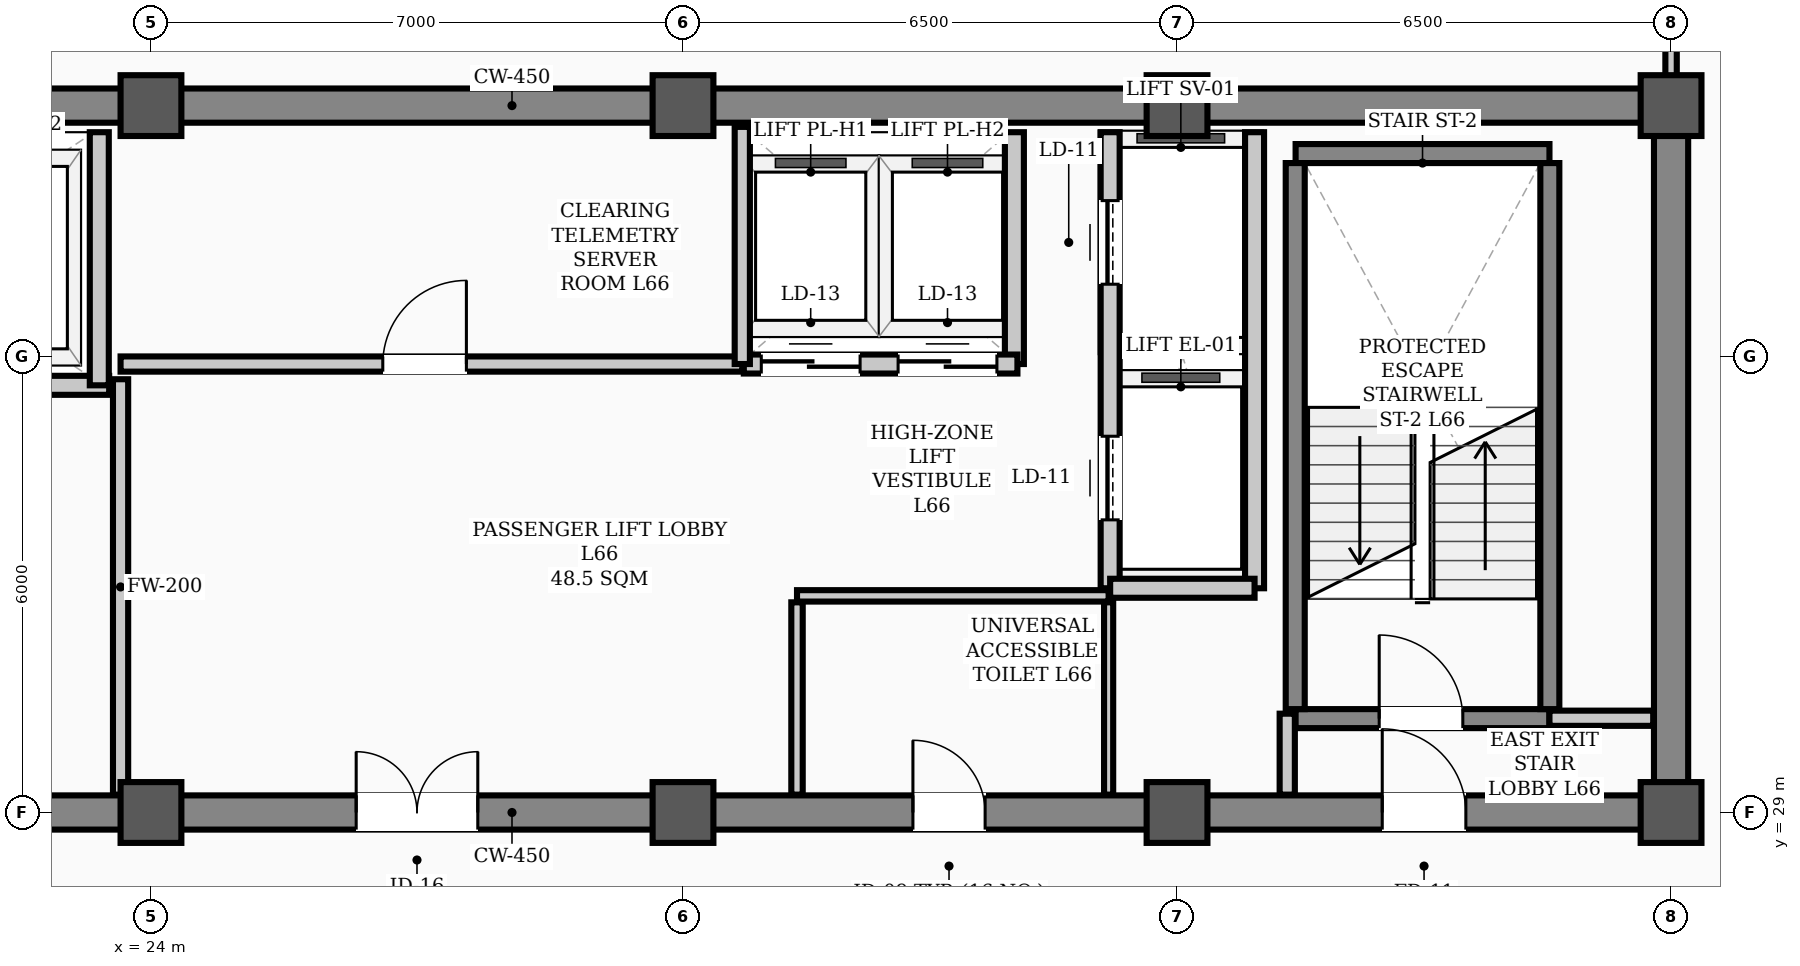
"""IFC4 building model, lengths in metres.
Left out: names, types, materials, properties, quantities, classifications, styles, units other than length and angle.
Written with IfcOpenShell. Run it as: python <this file> out.ifc"""

import sys

from ifc_helpers import new_model, si_unit, direction, frame, frame_2d, origin, origin_2d, place, context, subcontext, project, spatial, rectangle, hollow_rectangle, extrude, element, fill, save


model = new_model("IFC4")
c1 = context("Model", 3, precision=1e-05, world=origin(), true_north=direction((0.0, 1.0)))
c2 = subcontext(c1, "Body", "Model", "MODEL_VIEW")
j1 = project(units=[si_unit("LENGTHUNIT", "METRE"), si_unit("PLANEANGLEUNIT", "RADIAN")], contexts=[c1])
p1 = place(None, origin())
s1 = spatial("IfcSite", under=j1, at=p1, CompositionType="ELEMENT")
p2 = place(p1, origin())
s2 = spatial("IfcBuilding", under=s1, at=p2, CompositionType="ELEMENT")
p3 = place(p2, frame((0.0, 0.0, 265.7)))
s3 = spatial("IfcBuildingStorey", under=s2, at=p3, CompositionType="ELEMENT", Elevation=265.7)
for number, where, z_axis, x_axis in (
    (1, (24.0, 29.0, 0.0), (0.0, 0.0, 1.0), (1.0, 0.0, 0.0)),
    (2, (24.0, 38.3, 0.0), (0.0, 0.0, 1.0), (1.0, 0.0, 0.0)),
    (3, (31.0, 29.0, 0.0), (0.0, 0.0, 1.0), (1.0, 0.0, 0.0)),
    (4, (31.0, 38.3, 0.0), (0.0, 0.0, 1.0), (1.0, 0.0, 0.0)),
    (5, (37.5, 29.0, 0.0), (0.0, 0.0, 1.0), (1.0, 0.0, 0.0)),
    (6, (37.5, 38.3, 0.0), (0.0, 0.0, 1.0), (1.0, 0.0, 0.0)),
    (7, (44.0, 29.0, 0.0), (0.0, 0.0, 1.0), (1.0, 0.0, 0.0)),
    (8, (44.0, 38.3, 0.0), (0.0, 0.0, 1.0), (1.0, 0.0, 0.0)),
):
    element("IfcColumn", number, at=place(p3, frame(where, z_axis=z_axis, x_axis=x_axis)), inside=s3, PredefinedType="COLUMN", context=c2, shape_type="SweptSolid", body=[
        extrude(hollow_rectangle(XDim=0.8, YDim=0.8, WallThickness=0.032, InnerFilletRadius=0.016, OuterFilletRadius=0.048, at=origin_2d()), origin(), (0.0, 0.0, 1.0), 3.9),
    ])
p4 = place(p3, frame((13.5, 29.0, 0.0), z_axis=(0.0, 0.0, 1.0), x_axis=(1.0, 0.0, 0.0)))
e9 = element("IfcWall", 9, at=p4, inside=s3, PredefinedType="SHEAR", context=c2, shape_type="SweptSolid", body=[
    extrude(rectangle(XDim=30.5, YDim=0.45, at=frame_2d((15.25, 0.0))), origin(), (0.0, 0.0, 1.0), 3.72),
])
p5 = place(p4, frame((1.75, 0.0, 0.0)))
e10 = element("IfcOpeningElement", 10, at=p5, cuts=e9, PredefinedType="OPENING", context=c2, shape_type="SweptSolid", body=[
    extrude(rectangle(XDim=1.1, YDim=2.08, at=frame_2d((0.55, 1.04))), frame((0.0, 0.235, 0.0), z_axis=(0.0, -1.0, 0.0), x_axis=(1.0, 0.0, 0.0)), (0.0, 0.0, 1.0), 0.47),
])
p6 = place(p4, frame((26.7, 0.0, 0.0)))
e11 = element("IfcOpeningElement", 11, at=p6, cuts=e9, PredefinedType="OPENING", context=c2, shape_type="SweptSolid", body=[
    extrude(rectangle(XDim=1.1, YDim=2.08, at=frame_2d((0.55, 1.04))), frame((0.0, 0.235, 0.0), z_axis=(0.0, -1.0, 0.0), x_axis=(1.0, 0.0, 0.0)), (0.0, 0.0, 1.0), 0.47),
])
p7 = place(p4, frame((6.8, 0.0, 0.0)))
e12 = element("IfcOpeningElement", 12, at=p7, cuts=e9, PredefinedType="OPENING", context=c2, shape_type="SweptSolid", body=[
    extrude(rectangle(XDim=1.1, YDim=2.08, at=frame_2d((0.55, 1.04))), frame((0.0, 0.235, 0.0), z_axis=(0.0, -1.0, 0.0), x_axis=(1.0, 0.0, 0.0)), (0.0, 0.0, 1.0), 0.47),
])
p8 = place(p4, frame((13.2, 0.0, 0.0)))
e13 = element("IfcOpeningElement", 13, at=p8, cuts=e9, PredefinedType="OPENING", context=c2, shape_type="SweptSolid", body=[
    extrude(rectangle(XDim=1.6, YDim=2.08, at=frame_2d((0.8, 1.04))), frame((0.0, 0.235, 0.0), z_axis=(0.0, -1.0, 0.0), x_axis=(1.0, 0.0, 0.0)), (0.0, 0.0, 1.0), 0.47),
])
p9 = place(p4, frame((20.525, 0.0, 0.0)))
e14 = element("IfcOpeningElement", 14, at=p9, cuts=e9, PredefinedType="OPENING", context=c2, shape_type="SweptSolid", body=[
    extrude(rectangle(XDim=0.95, YDim=2.08, at=frame_2d((0.475, 1.04))), frame((0.0, 0.235, 0.0), z_axis=(0.0, -1.0, 0.0), x_axis=(1.0, 0.0, 0.0)), (0.0, 0.0, 1.0), 0.47),
])
p10 = place(p3, frame((13.5, 38.3, 0.0), z_axis=(0.0, 0.0, 1.0), x_axis=(1.0, 0.0, 0.0)))
e15 = element("IfcWall", 15, at=p10, inside=s3, PredefinedType="SHEAR", context=c2, shape_type="SweptSolid", body=[
    extrude(rectangle(XDim=30.5, YDim=0.45, at=frame_2d((15.25, 0.0))), origin(), (0.0, 0.0, 1.0), 3.72),
])
p11 = place(p3, frame((44.0, 29.35, 0.0), z_axis=(0.0, 0.0, 1.0), x_axis=(0.0, 1.0, 0.0)))
e16 = element("IfcWall", 16, at=p11, inside=s3, PredefinedType="SHEAR", context=c2, shape_type="SweptSolid", body=[
    extrude(rectangle(XDim=8.6, YDim=0.45, at=frame_2d((4.3, 0.0))), origin(), (0.0, 0.0, 1.0), 3.72),
])
p12 = place(p3, frame((39.06, 30.235, 0.0), z_axis=(0.0, 0.0, 1.0), x_axis=(1.0, 0.0, 0.0)))
e17 = element("IfcWall", 17, at=p12, inside=s3, PredefinedType="STANDARD", context=c2, shape_type="SweptSolid", body=[
    extrude(rectangle(XDim=3.34, YDim=0.25, at=frame_2d((1.67, 0.0))), origin(), (0.0, 0.0, 1.0), 3.72),
])
p13 = place(p12, frame((1.1, 0.0, 0.0)))
e18 = element("IfcOpeningElement", 18, at=p13, cuts=e17, PredefinedType="OPENING", context=c2, shape_type="SweptSolid", body=[
    extrude(rectangle(XDim=1.1, YDim=2.08, at=frame_2d((0.55, 1.04))), frame((0.0, 0.135, 0.0), z_axis=(0.0, -1.0, 0.0), x_axis=(1.0, 0.0, 0.0)), (0.0, 0.0, 1.0), 0.27),
])
p14 = place(p3, frame((39.06, 37.669, 0.0), z_axis=(0.0, 0.0, 1.0), x_axis=(1.0, 0.0, 0.0)))
e19 = element("IfcWall", 19, at=p14, inside=s3, PredefinedType="STANDARD", context=c2, shape_type="SweptSolid", body=[
    extrude(rectangle(XDim=3.34, YDim=0.25, at=frame_2d((1.67, 0.0))), origin(), (0.0, 0.0, 1.0), 3.72),
])
for number, where, z_axis, x_axis in (
    (20, (39.055, 30.36, 0.0), (0.0, 0.0, 1.0), (0.0, 1.0, 0.0)),
    (21, (42.405, 30.36, 0.0), (0.0, 0.0, 1.0), (0.0, 1.0, 0.0)),
):
    element("IfcWall", number, at=place(p3, frame(where, z_axis=z_axis, x_axis=x_axis)), inside=s3, PredefinedType="STANDARD", context=c2, shape_type="SweptSolid", body=[
        extrude(rectangle(XDim=7.184, YDim=0.25, at=frame_2d((3.592, 0.0))), origin(), (0.0, 0.0, 1.0), 3.72),
    ])
p15 = place(p3, frame((18.1, 34.62, 0.0), z_axis=(0.0, 0.0, 1.0), x_axis=(1.0, 0.0, 0.0)))
e22 = element("IfcWall", 22, at=p15, inside=s3, PredefinedType="STANDARD", context=c2, shape_type="SweptSolid", body=[
    extrude(rectangle(XDim=5.35, YDim=0.25, at=frame_2d((2.675, 0.0))), origin(), (0.0, 0.0, 1.0), 3.72),
])
p16 = place(p15, frame((0.85, 0.0, 0.0)))
e23 = element("IfcOpeningElement", 23, at=p16, cuts=e22, PredefinedType="OPENING", context=c2, shape_type="SweptSolid", body=[
    extrude(rectangle(XDim=1.1, YDim=2.08, at=frame_2d((0.55, 1.04))), frame((0.0, 0.135, 0.0), z_axis=(0.0, -1.0, 0.0), x_axis=(1.0, 0.0, 0.0)), (0.0, 0.0, 1.0), 0.27),
])
p17 = place(p15, frame((3.45, 0.0, 0.0)))
e24 = element("IfcOpeningElement", 24, at=p17, cuts=e22, PredefinedType="OPENING", context=c2, shape_type="SweptSolid", body=[
    extrude(rectangle(XDim=1.1, YDim=2.08, at=frame_2d((0.55, 1.04))), frame((0.0, 0.135, 0.0), z_axis=(0.0, -1.0, 0.0), x_axis=(1.0, 0.0, 0.0)), (0.0, 0.0, 1.0), 0.27),
])
p18 = place(p3, frame((36.62, 31.95, 0.0), z_axis=(0.0, 0.0, 1.0), x_axis=(0.0, 1.0, 0.0)))
e25 = element("IfcWall", 25, at=p18, inside=s3, PredefinedType="STANDARD", context=c2, shape_type="SweptSolid", body=[
    extrude(rectangle(XDim=6.0, YDim=0.25, at=frame_2d((3.0, 0.0))), origin(), (0.0, 0.0, 1.0), 3.4),
])
p19 = place(p18, frame((0.9, 0.0, 0.0)))
e26 = element("IfcOpeningElement", 26, at=p19, cuts=e25, PredefinedType="OPENING", context=c2, shape_type="SweptSolid", body=[
    extrude(rectangle(XDim=1.1, YDim=2.08, at=frame_2d((0.55, 1.04))), frame((0.0, 0.135, 0.0), z_axis=(0.0, -1.0, 0.0), x_axis=(1.0, 0.0, 0.0)), (0.0, 0.0, 1.0), 0.27),
])
p20 = place(p18, frame((4.0, 0.0, 0.0)))
e27 = element("IfcOpeningElement", 27, at=p20, cuts=e25, PredefinedType="OPENING", context=c2, shape_type="SweptSolid", body=[
    extrude(rectangle(XDim=1.1, YDim=2.08, at=frame_2d((0.55, 1.04))), frame((0.0, 0.135, 0.0), z_axis=(0.0, -1.0, 0.0), x_axis=(1.0, 0.0, 0.0)), (0.0, 0.0, 1.0), 0.27),
])
p21 = place(p3, frame((38.52, 31.95, 0.0), z_axis=(0.0, 0.0, 1.0), x_axis=(0.0, 1.0, 0.0)))
e28 = element("IfcWall", 28, at=p21, inside=s3, PredefinedType="STANDARD", context=c2, shape_type="SweptSolid", body=[
    extrude(rectangle(XDim=6.0, YDim=0.25, at=frame_2d((3.0, 0.0))), origin(), (0.0, 0.0, 1.0), 3.48),
])
p22 = place(p3, frame((36.62, 31.95, 0.0), z_axis=(0.0, 0.0, 1.0), x_axis=(1.0, 0.0, 0.0)))
e29 = element("IfcWall", 29, at=p22, inside=s3, PredefinedType="STANDARD", context=c2, shape_type="SweptSolid", body=[
    extrude(rectangle(XDim=1.9, YDim=0.25, at=frame_2d((0.95, 0.0))), origin(), (0.0, 0.0, 1.0), 3.48),
])
p23 = place(p3, frame((23.32, 34.62, 0.0), z_axis=(0.0, 0.0, 1.0), x_axis=(0.0, 1.0, 0.0)))
e30 = element("IfcWall", 30, at=p23, inside=s3, PredefinedType="STANDARD", context=c2, shape_type="SweptSolid", body=[
    extrude(rectangle(XDim=3.33, YDim=0.25, at=frame_2d((1.665, 0.0))), origin(), (0.0, 0.0, 1.0), 3.4),
])
p24 = place(p3, frame((35.36, 34.9, 0.0), z_axis=(0.0, 0.0, 1.0), x_axis=(0.0, 1.0, 0.0)))
e31 = element("IfcWall", 31, at=p24, inside=s3, PredefinedType="STANDARD", context=c2, shape_type="SweptSolid", body=[
    extrude(rectangle(XDim=3.05, YDim=0.25, at=frame_2d((1.525, 0.0))), origin(), (0.0, 0.0, 1.0), 3.4),
])
p25 = place(p3, frame((31.8, 34.9, 0.0), z_axis=(0.0, 0.0, 1.0), x_axis=(1.0, 0.0, 0.0)))
e32 = element("IfcWall", 32, at=p25, inside=s3, PredefinedType="STANDARD", context=c2, shape_type="SweptSolid", body=[
    extrude(rectangle(XDim=3.6, YDim=0.25, at=frame_2d((1.8, 0.0))), origin(), (0.0, 0.0, 1.0), 3.72),
])
p26 = place(p25, frame((0.23, 0.0, 0.0)))
e33 = element("IfcOpeningElement", 33, at=p26, cuts=e32, PredefinedType="OPENING", context=c2, shape_type="SweptSolid", body=[
    extrude(rectangle(XDim=1.3, YDim=2.08, at=frame_2d((0.65, 1.04))), frame((0.0, 0.135, 0.0), z_axis=(0.0, -1.0, 0.0), x_axis=(1.0, 0.0, 0.0)), (0.0, 0.0, 1.0), 0.27),
])
p27 = place(p25, frame((2.03, 0.0, 0.0)))
e34 = element("IfcOpeningElement", 34, at=p27, cuts=e32, PredefinedType="OPENING", context=c2, shape_type="SweptSolid", body=[
    extrude(rectangle(XDim=1.3, YDim=2.08, at=frame_2d((0.65, 1.04))), frame((0.0, 0.135, 0.0), z_axis=(0.0, -1.0, 0.0), x_axis=(1.0, 0.0, 0.0)), (0.0, 0.0, 1.0), 0.27),
])
p28 = place(p3, frame((42.4, 30.24, 0.0), z_axis=(0.0, 0.0, 1.0), x_axis=(1.0, 0.0, 0.0)))
e35 = element("IfcWall", 35, at=p28, inside=s3, PredefinedType="STANDARD", context=c2, shape_type="SweptSolid", body=[
    extrude(rectangle(XDim=1.365, YDim=0.2, at=frame_2d((0.683, 0.0))), origin(), (0.0, 0.0, 1.0), 3.72),
])
p29 = place(p3, frame((23.6, 34.9, 0.0), z_axis=(0.0, 0.0, 1.0), x_axis=(1.0, 0.0, 0.0)))
e36 = element("IfcWall", 36, at=p29, inside=s3, PredefinedType="STANDARD", context=c2, shape_type="SweptSolid", body=[
    extrude(rectangle(XDim=8.18, YDim=0.2, at=frame_2d((4.09, 0.0))), origin(), (0.0, 0.0, 1.0), 3.72),
])
p30 = place(p29, frame((3.45, 0.0, 0.0)))
e37 = element("IfcOpeningElement", 37, at=p30, cuts=e36, PredefinedType="OPENING", context=c2, shape_type="SweptSolid", body=[
    extrude(rectangle(XDim=1.1, YDim=2.08, at=frame_2d((0.55, 1.04))), frame((0.0, 0.11, 0.0), z_axis=(0.0, -1.0, 0.0), x_axis=(1.0, 0.0, 0.0)), (0.0, 0.0, 1.0), 0.22),
])
p31 = place(p3, frame((32.5, 31.85, 0.0), z_axis=(0.0, 0.0, 1.0), x_axis=(1.0, 0.0, 0.0)))
e38 = element("IfcWall", 38, at=p31, inside=s3, PredefinedType="PARTITIONING", context=c2, shape_type="SweptSolid", body=[
    extrude(rectangle(XDim=4.1, YDim=0.15, at=frame_2d((2.05, 0.0))), origin(), (0.0, 0.0, 1.0), 3.72),
])
p32 = place(p3, frame((38.95, 29.235, 0.0), z_axis=(0.0, 0.0, 1.0), x_axis=(0.0, 1.0, 0.0)))
e39 = element("IfcWall", 39, at=p32, inside=s3, PredefinedType="STANDARD", context=c2, shape_type="SweptSolid", body=[
    extrude(rectangle(XDim=1.065, YDim=0.2, at=frame_2d((0.532, 0.0))), origin(), (0.0, 0.0, 1.0), 3.72),
])
p33 = place(p3, frame((23.6, 29.235, 0.0), z_axis=(0.0, 0.0, 1.0), x_axis=(0.0, 1.0, 0.0)))
e40 = element("IfcWall", 40, at=p33, inside=s3, PredefinedType="STANDARD", context=c2, shape_type="SweptSolid", body=[
    extrude(rectangle(XDim=5.465, YDim=0.2, at=frame_2d((2.732, 0.0))), origin(), (0.0, 0.0, 1.0), 3.2),
])
p34 = place(p3, frame((32.5, 29.235, 0.0), z_axis=(0.0, 0.0, 1.0), x_axis=(0.0, 1.0, 0.0)))
e41 = element("IfcWall", 41, at=p34, inside=s3, PredefinedType="PARTITIONING", context=c2, shape_type="SweptSolid", body=[
    extrude(rectangle(XDim=2.53, YDim=0.15, at=frame_2d((1.265, 0.0))), origin(), (0.0, 0.0, 1.0), 3.4),
])
p35 = place(p3, frame((36.6, 29.235, 0.0), z_axis=(0.0, 0.0, 1.0), x_axis=(0.0, 1.0, 0.0)))
e42 = element("IfcWall", 42, at=p35, inside=s3, PredefinedType="PARTITIONING", context=c2, shape_type="SweptSolid", body=[
    extrude(rectangle(XDim=2.53, YDim=0.12, at=frame_2d((1.265, 0.0))), origin(), (0.0, 0.0, 1.0), 3.4),
])
p36 = place(p3, frame((44.0, 38.535, 0.0), z_axis=(0.0, 0.0, 1.0), x_axis=(0.0, 1.0, 0.0)))
e43 = element("IfcWall", 43, at=p36, inside=s3, PredefinedType="PARTITIONING", context=c2, shape_type="SweptSolid", body=[
    extrude(rectangle(XDim=3.205, YDim=0.15, at=frame_2d((1.603, 0.0))), origin(), (0.0, 0.0, 1.0), 3.72),
])
p37 = place(p3, frame((31.78, 34.9, 0.0), z_axis=(0.0, 0.0, 1.0), x_axis=(0.0, 1.0, 0.0)))
e44 = element("IfcWall", 44, at=p37, inside=s3, PredefinedType="STANDARD", context=c2, shape_type="SweptSolid", body=[
    extrude(rectangle(XDim=3.12, YDim=0.2, at=frame_2d((1.56, 0.0))), origin(), (0.0, 0.0, 1.0), 3.4),
])
p38 = place(p13, origin())
e45 = element("IfcDoor", 45, at=p38, inside=s3, OperationType="SINGLE_SWING_LEFT", PredefinedType="DOOR", context=c2, shape_type="SweptSolid", body=[
    extrude(rectangle(XDim=1.1, YDim=2.08, at=frame_2d((0.55, 1.04))), frame((0.0, 0.025, 0.0), z_axis=(0.0, -1.0, 0.0), x_axis=(1.0, 0.0, 0.0)), (0.0, 0.0, 1.0), 0.05),
])
fill(e18, e45)
p39 = place(p6, origin())
e46 = element("IfcDoor", 46, at=p39, inside=s3, OperationType="SINGLE_SWING_LEFT", PredefinedType="DOOR", context=c2, shape_type="SweptSolid", body=[
    extrude(rectangle(XDim=1.1, YDim=2.08, at=frame_2d((0.55, 1.04))), frame((0.0, 0.025, 0.0), z_axis=(0.0, -1.0, 0.0), x_axis=(1.0, 0.0, 0.0)), (0.0, 0.0, 1.0), 0.05),
])
fill(e11, e46)
p40 = place(p8, origin())
e47 = element("IfcDoor", 47, at=p40, inside=s3, OperationType="DOUBLE_DOOR_SINGLE_SWING", PredefinedType="DOOR", context=c2, shape_type="SweptSolid", body=[
    extrude(rectangle(XDim=1.6, YDim=2.08, at=frame_2d((0.8, 1.04))), frame((0.0, 0.025, 0.0), z_axis=(0.0, -1.0, 0.0), x_axis=(1.0, 0.0, 0.0)), (0.0, 0.0, 1.0), 0.05),
])
fill(e13, e47)
p41 = place(p30, origin())
e48 = element("IfcDoor", 48, at=p41, inside=s3, OperationType="SINGLE_SWING_RIGHT", PredefinedType="DOOR", context=c2, shape_type="SweptSolid", body=[
    extrude(rectangle(XDim=1.1, YDim=2.08, at=frame_2d((0.55, 1.04))), frame((0.0, 0.025, 0.0), z_axis=(0.0, -1.0, 0.0), x_axis=(1.0, 0.0, 0.0)), (0.0, 0.0, 1.0), 0.05),
])
fill(e37, e48)
p42 = place(p9, origin())
e49 = element("IfcDoor", 49, at=p42, inside=s3, OperationType="SINGLE_SWING_LEFT", PredefinedType="DOOR", context=c2, shape_type="SweptSolid", body=[
    extrude(rectangle(XDim=0.95, YDim=2.08, at=frame_2d((0.475, 1.04))), frame((0.0, 0.025, 0.0), z_axis=(0.0, -1.0, 0.0), x_axis=(1.0, 0.0, 0.0)), (0.0, 0.0, 1.0), 0.05),
])
fill(e14, e49)
p43 = place(p19, origin())
e50 = element("IfcDoor", 50, at=p43, inside=s3, OperationType="SLIDING_TO_LEFT", PredefinedType="DOOR", context=c2, shape_type="SweptSolid", body=[
    extrude(rectangle(XDim=1.1, YDim=2.08, at=frame_2d((0.55, 1.04))), frame((0.0, 0.025, 0.0), z_axis=(0.0, -1.0, 0.0), x_axis=(1.0, 0.0, 0.0)), (0.0, 0.0, 1.0), 0.05),
])
fill(e26, e50)
p44 = place(p20, origin())
e51 = element("IfcDoor", 51, at=p44, inside=s3, OperationType="SLIDING_TO_LEFT", PredefinedType="DOOR", context=c2, shape_type="SweptSolid", body=[
    extrude(rectangle(XDim=1.1, YDim=2.08, at=frame_2d((0.55, 1.04))), frame((0.0, 0.025, 0.0), z_axis=(0.0, -1.0, 0.0), x_axis=(1.0, 0.0, 0.0)), (0.0, 0.0, 1.0), 0.05),
])
fill(e27, e51)
p45 = place(p26, origin())
e52 = element("IfcDoor", 52, at=p45, inside=s3, OperationType="DOUBLE_DOOR_SLIDING", PredefinedType="DOOR", context=c2, shape_type="SweptSolid", body=[
    extrude(rectangle(XDim=1.3, YDim=2.08, at=frame_2d((0.65, 1.04))), frame((0.0, 0.025, 0.0), z_axis=(0.0, -1.0, 0.0), x_axis=(1.0, 0.0, 0.0)), (0.0, 0.0, 1.0), 0.05),
])
fill(e33, e52)
p46 = place(p27, origin())
e53 = element("IfcDoor", 53, at=p46, inside=s3, OperationType="DOUBLE_DOOR_SLIDING", PredefinedType="DOOR", context=c2, shape_type="SweptSolid", body=[
    extrude(rectangle(XDim=1.3, YDim=2.08, at=frame_2d((0.65, 1.04))), frame((0.0, 0.025, 0.0), z_axis=(0.0, -1.0, 0.0), x_axis=(1.0, 0.0, 0.0)), (0.0, 0.0, 1.0), 0.05),
])
fill(e34, e53)
save(model, sys.argv[1])
